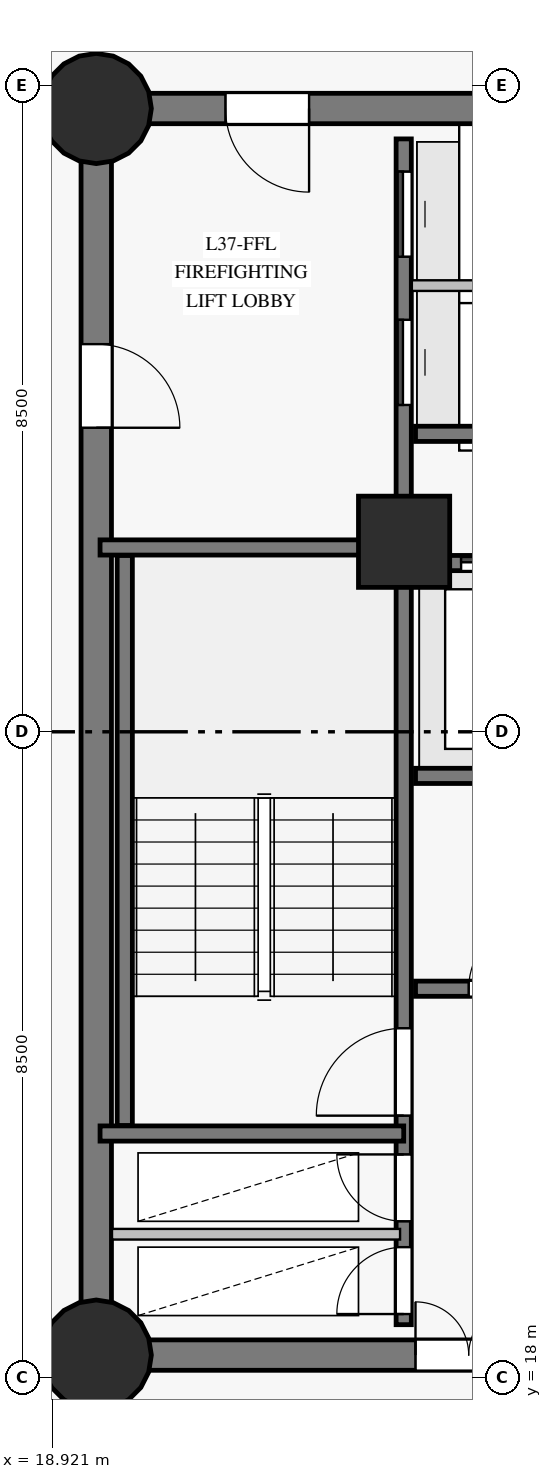
"""IFC4 building model, lengths in metres.
Left out: names, types, materials, properties, quantities, classifications, styles, units other than length and angle.
Written with IfcOpenShell. Run it as: python <this file> out.ifc"""

import sys

from ifc_helpers import new_model, si_unit, direction, frame, frame_2d, origin, origin_with_axes, origin_2d, place, context, subcontext, project, spatial, rectangle, circle, extrude, source, transform, mapped, element, fill, save


model = new_model("IFC4")
c1 = context("Model", 3, precision=1e-05, world=origin(), true_north=direction((0.0, 1.0)))
c2 = subcontext(c1, "Body", "Model", "MODEL_VIEW")
j1 = project(units=[si_unit("LENGTHUNIT", "METRE"), si_unit("PLANEANGLEUNIT", "RADIAN")], contexts=[c1])
p1 = place(None, origin())
s1 = spatial("IfcSite", under=j1, at=p1, CompositionType="ELEMENT")
p2 = place(p1, origin())
s2 = spatial("IfcBuilding", under=s1, at=p2, CompositionType="ELEMENT")
p3 = place(p2, frame((0.0, 0.0, 132.8)))
s3 = spatial("IfcBuildingStorey", under=s2, at=p3, CompositionType="ELEMENT", Elevation=132.8)
p4 = place(p3, frame((19.5, 18.3, 0.0), z_axis=(0.0, 0.0, 1.0), x_axis=(1.0, 0.0, 0.0)))
e1 = element("IfcWall", 1, at=p4, inside=s3, PredefinedType="SHEAR", context=c2, shape_type="SweptSolid", body=[
    extrude(rectangle(XDim=7.05, YDim=0.4, at=frame_2d((3.525, 0.0))), origin(), (0.0, 0.0, 1.0), 2.825),
])
p5 = place(p4, frame((4.2, 0.0, 0.0)))
e2 = element("IfcOpeningElement", 2, at=p5, cuts=e1, PredefinedType="OPENING", context=c2, shape_type="SweptSolid", body=[
    extrude(rectangle(XDim=1.4, YDim=2.2, at=frame_2d((0.7, 1.1))), frame((0.0, 0.21, 0.0), z_axis=(0.0, -1.0, 0.0), x_axis=(1.0, 0.0, 0.0)), (0.0, 0.0, 1.0), 0.42),
])
p6 = place(p3, frame((26.55, 34.7, 0.0), z_axis=(0.0, 0.0, 1.0), x_axis=(-1.0, 0.0, 0.0)))
e3 = element("IfcWall", 3, at=p6, inside=s3, PredefinedType="SHEAR", context=c2, shape_type="SweptSolid", body=[
    extrude(rectangle(XDim=7.05, YDim=0.4, at=frame_2d((3.525, 0.0))), origin(), (0.0, 0.0, 1.0), 2.825),
])
p7 = place(p6, frame((4.25, 0.0, 0.0)))
e4 = element("IfcOpeningElement", 4, at=p7, cuts=e3, PredefinedType="OPENING", context=c2, shape_type="SweptSolid", body=[
    extrude(rectangle(XDim=1.1, YDim=2.15, at=frame_2d((0.55, 1.075))), frame((0.0, 0.21, 0.0), z_axis=(0.0, -1.0, 0.0), x_axis=(1.0, 0.0, 0.0)), (0.0, 0.0, 1.0), 0.42),
])
p8 = place(p3, frame((19.5, 34.7, 0.0), z_axis=(0.0, 0.0, 1.0), x_axis=(0.0, -1.0, 0.0)))
e5 = element("IfcWall", 5, at=p8, inside=s3, PredefinedType="SHEAR", context=c2, shape_type="SweptSolid", body=[
    extrude(rectangle(XDim=16.4, YDim=0.4, at=frame_2d((8.2, 0.0))), origin(), (0.0, 0.0, 1.0), 2.825),
])
p9 = place(p8, frame((3.1, 0.0, 0.0)))
e6 = element("IfcOpeningElement", 6, at=p9, cuts=e5, PredefinedType="OPENING", context=c2, shape_type="SweptSolid", body=[
    extrude(rectangle(XDim=1.1, YDim=2.15, at=frame_2d((0.55, 1.075))), frame((0.0, 0.21, 0.0), z_axis=(0.0, -1.0, 0.0), x_axis=(1.0, 0.0, 0.0)), (0.0, 0.0, 1.0), 0.42),
])
m1 = source(origin_with_axes(), c2, "Body", "SweptSolid", [
    extrude(circle(Radius=0.725, at=origin_2d()), origin(), (0.0, 0.0, 1.0), 3.05),
])
for number, where, z_axis, x_axis in (
    (7, (19.5, 18.3, 0.0), (0.0, 0.0, 1.0), (1.0, 0.0, 0.0)),
    (8, (19.5, 34.7, 0.0), (0.0, 0.0, 1.0), (1.0, 0.0, 0.0)),
):
    element("IfcColumn", number, at=place(p3, frame(where, z_axis=z_axis, x_axis=x_axis)), inside=s3, PredefinedType="COLUMN", context=c2, shape_type="MappedRepresentation", body=[
        mapped(m1, transform((0.0, 0.0, 0.0), scale=1.0)),
    ])
m2 = source(origin_with_axes(), c2, "Body", "SweptSolid", [
    extrude(rectangle(XDim=1.2, YDim=1.2, at=origin_2d()), origin(), (0.0, 0.0, 1.0), 3.05),
])
p10 = place(p3, frame((23.55, 29.0, 0.0), z_axis=(0.0, 0.0, 1.0), x_axis=(1.0, 0.0, 0.0)))
e9 = element("IfcColumn", 9, at=p10, inside=s3, PredefinedType="COLUMN", context=c2, shape_type="MappedRepresentation", body=[
    mapped(m2, transform((0.0, 0.0, 0.0), scale=1.0)),
])
p11 = place(p3, frame((23.545, 18.7, 0.0), z_axis=(0.0, 0.0, 1.0), x_axis=(0.0, 1.0, 0.0)))
e10 = element("IfcWall", 10, at=p11, inside=s3, PredefinedType="SHEAR", context=c2, shape_type="SweptSolid", body=[
    extrude(rectangle(XDim=15.6, YDim=0.2, at=frame_2d((7.8, 0.0))), origin(), (0.0, 0.0, 1.0), 2.825),
])
p12 = place(p11, frame((2.75, 0.0, 0.0)))
e11 = element("IfcOpeningElement", 11, at=p12, cuts=e10, PredefinedType="OPENING", context=c2, shape_type="SweptSolid", body=[
    extrude(rectangle(XDim=1.15, YDim=2.15, at=frame_2d((0.575, 1.075))), frame((0.0, 0.11, 0.0), z_axis=(0.0, -1.0, 0.0), x_axis=(1.0, 0.0, 0.0)), (0.0, 0.0, 1.0), 0.22),
])
p13 = place(p11, frame((0.14, 0.0, 0.0)))
e12 = element("IfcOpeningElement", 12, at=p13, cuts=e10, PredefinedType="OPENING", context=c2, shape_type="SweptSolid", body=[
    extrude(rectangle(XDim=0.88, YDim=2.1, at=frame_2d((0.44, 1.05))), frame((0.0, 0.11, 0.0), z_axis=(0.0, -1.0, 0.0), x_axis=(1.0, 0.0, 0.0)), (0.0, 0.0, 1.0), 0.22),
])
p14 = place(p11, frame((1.36, 0.0, 0.0)))
e13 = element("IfcOpeningElement", 13, at=p14, cuts=e10, PredefinedType="OPENING", context=c2, shape_type="SweptSolid", body=[
    extrude(rectangle(XDim=0.88, YDim=2.1, at=frame_2d((0.44, 1.05))), frame((0.0, 0.11, 0.0), z_axis=(0.0, -1.0, 0.0), x_axis=(1.0, 0.0, 0.0)), (0.0, 0.0, 1.0), 0.22),
])
p15 = place(p11, frame((12.1, 0.0, 0.0)))
e14 = element("IfcOpeningElement", 14, at=p15, cuts=e10, PredefinedType="OPENING", context=c2, shape_type="SweptSolid", body=[
    extrude(rectangle(XDim=1.12, YDim=2.15, at=frame_2d((0.56, 1.075))), frame((0.0, 0.11, 0.0), z_axis=(0.0, -1.0, 0.0), x_axis=(1.0, 0.0, 0.0)), (0.0, 0.0, 1.0), 0.22),
])
p16 = place(p11, frame((14.05, 0.0, 0.0)))
e15 = element("IfcOpeningElement", 15, at=p16, cuts=e10, PredefinedType="OPENING", context=c2, shape_type="SweptSolid", body=[
    extrude(rectangle(XDim=1.12, YDim=2.15, at=frame_2d((0.56, 1.075))), frame((0.0, 0.11, 0.0), z_axis=(0.0, -1.0, 0.0), x_axis=(1.0, 0.0, 0.0)), (0.0, 0.0, 1.0), 0.22),
])
p17 = place(p3, frame((23.7, 23.12, 0.0), z_axis=(0.0, 0.0, 1.0), x_axis=(1.0, 0.0, 0.0)))
e16 = element("IfcWall", 16, at=p17, inside=s3, PredefinedType="SHEAR", context=c2, shape_type="SweptSolid", body=[
    extrude(rectangle(XDim=9.6, YDim=0.2, at=frame_2d((4.8, 0.0))), origin(), (0.0, 0.0, 1.0), 2.825),
])
p18 = place(p17, frame((0.7, 0.0, 0.0)))
e17 = element("IfcOpeningElement", 17, at=p18, cuts=e16, PredefinedType="OPENING", context=c2, shape_type="SweptSolid", body=[
    extrude(rectangle(XDim=0.92, YDim=2.1, at=frame_2d((0.46, 1.05))), frame((0.0, 0.11, 0.0), z_axis=(0.0, -1.0, 0.0), x_axis=(1.0, 0.0, 0.0)), (0.0, 0.0, 1.0), 0.22),
])
p19 = place(p17, frame((4.2, 0.0, 0.0)))
e18 = element("IfcOpeningElement", 18, at=p19, cuts=e16, PredefinedType="OPENING", context=c2, shape_type="SweptSolid", body=[
    extrude(rectangle(XDim=0.92, YDim=2.1, at=frame_2d((0.46, 1.05))), frame((0.0, 0.11, 0.0), z_axis=(0.0, -1.0, 0.0), x_axis=(1.0, 0.0, 0.0)), (0.0, 0.0, 1.0), 0.22),
])
p20 = place(p17, frame((7.45, 0.0, 0.0)))
e19 = element("IfcOpeningElement", 19, at=p20, cuts=e16, PredefinedType="OPENING", context=c2, shape_type="SweptSolid", body=[
    extrude(rectangle(XDim=0.92, YDim=2.1, at=frame_2d((0.46, 1.05))), frame((0.0, 0.11, 0.0), z_axis=(0.0, -1.0, 0.0), x_axis=(1.0, 0.0, 0.0)), (0.0, 0.0, 1.0), 0.22),
])
p21 = place(p3, frame((23.7, 25.92, 0.0), z_axis=(0.0, 0.0, 1.0), x_axis=(1.0, 0.0, 0.0)))
e20 = element("IfcWall", 20, at=p21, inside=s3, PredefinedType="SHEAR", context=c2, shape_type="SweptSolid", body=[
    extrude(rectangle(XDim=9.6, YDim=0.2, at=frame_2d((4.8, 0.0))), origin(), (0.0, 0.0, 1.0), 2.825),
])
p22 = place(p3, frame((23.7, 28.72, 0.0), z_axis=(0.0, 0.0, 1.0), x_axis=(1.0, 0.0, 0.0)))
e21 = element("IfcWall", 21, at=p22, inside=s3, PredefinedType="SHEAR", context=c2, shape_type="SweptSolid", body=[
    extrude(rectangle(XDim=9.6, YDim=0.2, at=frame_2d((4.8, 0.0))), origin(), (0.0, 0.0, 1.0), 2.825),
])
p23 = place(p22, frame((0.6, 0.0, 0.0)))
e22 = element("IfcOpeningElement", 22, at=p23, cuts=e21, PredefinedType="OPENING", context=c2, shape_type="SweptSolid", body=[
    extrude(rectangle(XDim=1.1, YDim=2.15, at=frame_2d((0.55, 1.075))), frame((0.0, 0.11, 0.0), z_axis=(0.0, -1.0, 0.0), x_axis=(1.0, 0.0, 0.0)), (0.0, 0.0, 1.0), 0.22),
])
p24 = place(p22, frame((2.98, 0.0, 0.0)))
e23 = element("IfcOpeningElement", 23, at=p24, cuts=e21, PredefinedType="OPENING", context=c2, shape_type="SweptSolid", body=[
    extrude(rectangle(XDim=1.1, YDim=2.15, at=frame_2d((0.55, 1.075))), frame((0.0, 0.11, 0.0), z_axis=(0.0, -1.0, 0.0), x_axis=(1.0, 0.0, 0.0)), (0.0, 0.0, 1.0), 0.22),
])
p25 = place(p22, frame((5.36, 0.0, 0.0)))
e24 = element("IfcOpeningElement", 24, at=p25, cuts=e21, PredefinedType="OPENING", context=c2, shape_type="SweptSolid", body=[
    extrude(rectangle(XDim=1.1, YDim=2.15, at=frame_2d((0.55, 1.075))), frame((0.0, 0.11, 0.0), z_axis=(0.0, -1.0, 0.0), x_axis=(1.0, 0.0, 0.0)), (0.0, 0.0, 1.0), 0.22),
])
p26 = place(p22, frame((7.74, 0.0, 0.0)))
e25 = element("IfcOpeningElement", 25, at=p26, cuts=e21, PredefinedType="OPENING", context=c2, shape_type="SweptSolid", body=[
    extrude(rectangle(XDim=1.1, YDim=2.15, at=frame_2d((0.55, 1.075))), frame((0.0, 0.11, 0.0), z_axis=(0.0, -1.0, 0.0), x_axis=(1.0, 0.0, 0.0)), (0.0, 0.0, 1.0), 0.22),
])
p27 = place(p3, frame((19.875, 21.32, 0.0), z_axis=(0.0, 0.0, 1.0), x_axis=(0.0, 1.0, 0.0)))
e26 = element("IfcWall", 26, at=p27, inside=s3, PredefinedType="SHEAR", context=c2, shape_type="SweptSolid", body=[
    extrude(rectangle(XDim=7.5, YDim=0.2, at=frame_2d((3.75, 0.0))), origin(), (0.0, 0.0, 1.0), 2.825),
])
for number, where, z_axis, x_axis in (
    (27, (19.55, 21.215, 0.0), (0.0, 0.0, 1.0), (1.0, 0.0, 0.0)),
    (28, (19.55, 28.925, 0.0), (0.0, 0.0, 1.0), (1.0, 0.0, 0.0)),
):
    element("IfcWall", number, at=place(p3, frame(where, z_axis=z_axis, x_axis=x_axis)), inside=s3, PredefinedType="SHEAR", context=c2, shape_type="SweptSolid", body=[
        extrude(rectangle(XDim=3.995, YDim=0.2, at=frame_2d((1.998, 0.0))), origin(), (0.0, 0.0, 1.0), 2.825),
    ])
p28 = place(p3, frame((23.7, 30.42, 0.0), z_axis=(0.0, 0.0, 1.0), x_axis=(1.0, 0.0, 0.0)))
e29 = element("IfcWall", 29, at=p28, inside=s3, PredefinedType="SHEAR", context=c2, shape_type="SweptSolid", body=[
    extrude(rectangle(XDim=2.78, YDim=0.2, at=frame_2d((1.39, 0.0))), origin(), (0.0, 0.0, 1.0), 2.825),
])
p29 = place(p3, frame((19.707, 19.89, 0.0), z_axis=(0.0, 0.0, 1.0), x_axis=(1.0, 0.0, 0.0)))
e30 = element("IfcWall", 30, at=p29, inside=s3, PredefinedType="PARTITIONING", context=c2, shape_type="SweptSolid", body=[
    extrude(rectangle(XDim=3.79, YDim=0.14, at=frame_2d((1.895, 0.0))), origin(), (0.0, 0.0, 1.0), 2.825),
])
p30 = place(p3, frame((23.652, 32.37, 0.0), z_axis=(0.0, 0.0, 1.0), x_axis=(1.0, 0.0, 0.0)))
e31 = element("IfcWall", 31, at=p30, inside=s3, PredefinedType="PARTITIONING", context=c2, shape_type="SweptSolid", body=[
    extrude(rectangle(XDim=2.828, YDim=0.14, at=frame_2d((1.414, 0.0))), origin(), (0.0, 0.0, 1.0), 2.825),
])
m3 = source(origin_with_axes(), c2, "Body", "SweptSolid", [
    extrude(rectangle(XDim=1.15, YDim=2.15, at=frame_2d((0.575, 1.075))), frame((0.0, 0.025, 0.0), z_axis=(0.0, -1.0, 0.0), x_axis=(1.0, 0.0, 0.0)), (0.0, 0.0, 1.0), 0.05),
])
p31 = place(p12, origin())
e32 = element("IfcDoor", 32, at=p31, inside=s3, OperationType="SINGLE_SWING_LEFT", PredefinedType="DOOR", context=c2, shape_type="MappedRepresentation", body=[
    mapped(m3, transform((0.0, 0.0, 0.0), scale=1.0)),
])
fill(e11, e32)
m4 = source(origin_with_axes(), c2, "Body", "SweptSolid", [
    extrude(rectangle(XDim=1.1, YDim=2.15, at=frame_2d((0.55, 1.075))), frame((0.0, 0.025, 0.0), z_axis=(0.0, -1.0, 0.0), x_axis=(1.0, 0.0, 0.0)), (0.0, 0.0, 1.0), 0.05),
])
p32 = place(p7, origin())
e33 = element("IfcDoor", 33, at=p32, inside=s3, OperationType="SINGLE_SWING_LEFT", PredefinedType="DOOR", context=c2, shape_type="MappedRepresentation", body=[
    mapped(m4, transform((0.0, 0.0, 0.0), scale=1.0)),
])
fill(e4, e33)
p33 = place(p9, origin())
e34 = element("IfcDoor", 34, at=p33, inside=s3, OperationType="SINGLE_SWING_RIGHT", PredefinedType="DOOR", context=c2, shape_type="MappedRepresentation", body=[
    mapped(m4, transform((0.0, 0.0, 0.0), scale=1.0)),
])
fill(e6, e34)
m5 = source(origin_with_axes(), c2, "Body", "SweptSolid", [
    extrude(rectangle(XDim=0.88, YDim=2.1, at=frame_2d((0.44, 1.05))), frame((0.0, 0.025, 0.0), z_axis=(0.0, -1.0, 0.0), x_axis=(1.0, 0.0, 0.0)), (0.0, 0.0, 1.0), 0.05),
])
p34 = place(p13, origin())
e35 = element("IfcDoor", 35, at=p34, inside=s3, OperationType="SINGLE_SWING_LEFT", PredefinedType="DOOR", context=c2, shape_type="MappedRepresentation", body=[
    mapped(m5, transform((0.0, 0.0, 0.0), scale=1.0)),
])
fill(e12, e35)
p35 = place(p14, origin())
e36 = element("IfcDoor", 36, at=p35, inside=s3, OperationType="SINGLE_SWING_RIGHT", PredefinedType="DOOR", context=c2, shape_type="MappedRepresentation", body=[
    mapped(m5, transform((0.0, 0.0, 0.0), scale=1.0)),
])
fill(e13, e36)
m6 = source(origin_with_axes(), c2, "Body", "SweptSolid", [
    extrude(rectangle(XDim=1.4, YDim=2.2, at=frame_2d((0.7, 1.1))), frame((0.0, 0.025, 0.0), z_axis=(0.0, -1.0, 0.0), x_axis=(1.0, 0.0, 0.0)), (0.0, 0.0, 1.0), 0.05),
])
p36 = place(p5, origin())
e37 = element("IfcDoor", 37, at=p36, inside=s3, OperationType="DOUBLE_DOOR_SINGLE_SWING", PredefinedType="DOOR", context=c2, shape_type="MappedRepresentation", body=[
    mapped(m6, transform((0.0, 0.0, 0.0), scale=1.0)),
])
fill(e2, e37)
m7 = source(origin_with_axes(), c2, "Body", "SweptSolid", [
    extrude(rectangle(XDim=0.92, YDim=2.1, at=frame_2d((0.46, 1.05))), frame((0.0, 0.025, 0.0), z_axis=(0.0, -1.0, 0.0), x_axis=(1.0, 0.0, 0.0)), (0.0, 0.0, 1.0), 0.05),
])
p37 = place(p18, origin())
e38 = element("IfcDoor", 38, at=p37, inside=s3, OperationType="SINGLE_SWING_RIGHT", PredefinedType="DOOR", context=c2, shape_type="MappedRepresentation", body=[
    mapped(m7, transform((0.0, 0.0, 0.0), scale=1.0)),
])
fill(e17, e38)
p38 = place(p23, origin())
e39 = element("IfcDoor", 39, at=p38, inside=s3, OperationType="SLIDING_TO_LEFT", PredefinedType="DOOR", context=c2, shape_type="MappedRepresentation", body=[
    mapped(m4, transform((0.0, 0.0, 0.0), scale=1.0)),
])
fill(e22, e39)
m8 = source(origin_with_axes(), c2, "Body", "SweptSolid", [
    extrude(rectangle(XDim=1.12, YDim=2.15, at=frame_2d((0.56, 1.075))), frame((0.0, 0.025, 0.0), z_axis=(0.0, -1.0, 0.0), x_axis=(1.0, 0.0, 0.0)), (0.0, 0.0, 1.0), 0.05),
])
p39 = place(p15, origin())
e40 = element("IfcDoor", 40, at=p39, inside=s3, OperationType="SLIDING_TO_LEFT", PredefinedType="DOOR", context=c2, shape_type="MappedRepresentation", body=[
    mapped(m8, transform((0.0, 0.0, 0.0), scale=1.0)),
])
fill(e14, e40)
p40 = place(p16, origin())
e41 = element("IfcDoor", 41, at=p40, inside=s3, OperationType="SLIDING_TO_RIGHT", PredefinedType="DOOR", context=c2, shape_type="MappedRepresentation", body=[
    mapped(m8, transform((0.0, 0.0, 0.0), scale=1.0)),
])
fill(e15, e41)
save(model, sys.argv[1])
